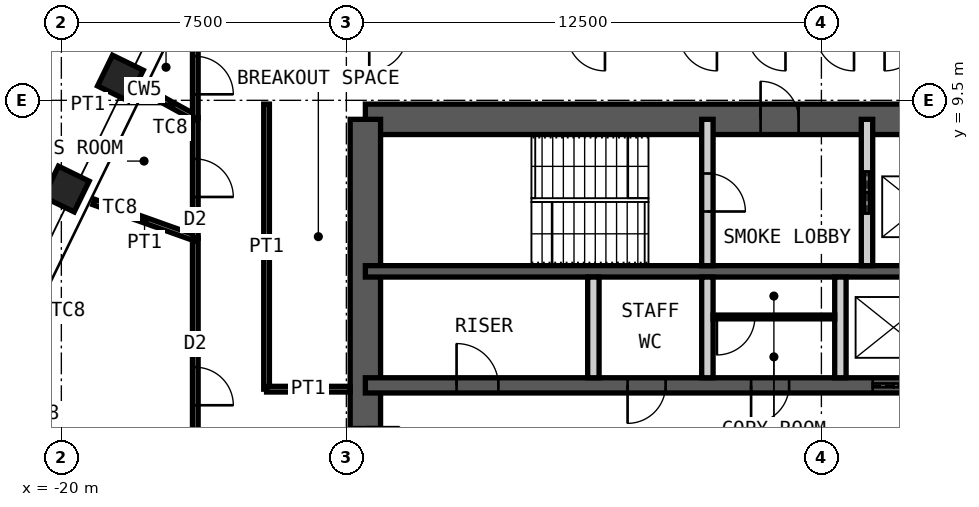
"""IFC4 building model, lengths in metres.
Left out: names, types, materials, properties, quantities, classifications, styles, units other than length and angle.
Written with IfcOpenShell. Run it as: python <this file> out.ifc"""

import sys

from ifc_helpers import new_model, si_unit, direction, frame, frame_2d, origin, origin_2d, place, context, subcontext, project, spatial, rectangle, hollow_rectangle, extrude, element, fill, save


model = new_model("IFC4")
c1 = context("Model", 3, precision=1e-05, world=origin(), true_north=direction((0.0, 1.0)))
c2 = subcontext(c1, "Body", "Model", "MODEL_VIEW")
j1 = project(units=[si_unit("LENGTHUNIT", "METRE"), si_unit("PLANEANGLEUNIT", "RADIAN")], contexts=[c1])
p1 = place(None, origin())
s1 = spatial("IfcSite", under=j1, at=p1, CompositionType="ELEMENT")
p2 = place(p1, origin())
s2 = spatial("IfcBuilding", under=s1, at=p2, CompositionType="ELEMENT")
p3 = place(p2, frame((0.0, 0.0, 312.4)))
s3 = spatial("IfcBuildingStorey", under=s2, at=p3, CompositionType="ELEMENT", Elevation=312.4)
for number, where, z_axis, x_axis in (
    (1, (-19.87, 7.166, 0.0), (0.0, 0.0, 1.0), (-0.438, -0.899, 0.0)),
    (2, (-18.446, 10.085, 0.0), (0.0, 0.0, 1.0), (-0.438, -0.899, 0.0)),
):
    element("IfcColumn", number, at=place(p3, frame(where, z_axis=z_axis, x_axis=x_axis)), inside=s3, PredefinedType="COLUMN", context=c2, shape_type="SweptSolid", body=[
        extrude(hollow_rectangle(XDim=0.9, YDim=0.9, WallThickness=0.05, at=origin_2d()), origin(), (0.0, 0.0, 1.0), 4.2),
    ])
p4 = place(p3, frame((-12.0, 9.0, 0.0), z_axis=(0.0, 0.0, 1.0), x_axis=(1.0, 0.0, 0.0)))
e3 = element("IfcWall", 3, at=p4, inside=s3, PredefinedType="SHEAR", context=c2, shape_type="SweptSolid", body=[
    extrude(rectangle(XDim=24.0, YDim=0.8, at=frame_2d((12.0, 0.0))), origin(), (0.0, 0.0, 1.0), 4.2),
])
p5 = place(p4, frame((10.4, 0.0, 0.0)))
e4 = element("IfcOpeningElement", 4, at=p5, cuts=e3, PredefinedType="OPENING", context=c2, shape_type="SweptSolid", body=[
    extrude(rectangle(XDim=1.0, YDim=2.1, at=frame_2d((0.5, 1.05))), frame((0.0, 0.41, 0.0), z_axis=(0.0, -1.0, 0.0), x_axis=(1.0, 0.0, 0.0)), (0.0, 0.0, 1.0), 0.82),
])
p6 = place(p4, frame((17.6, 0.0, 0.0)))
e5 = element("IfcOpeningElement", 5, at=p6, cuts=e3, PredefinedType="OPENING", context=c2, shape_type="SweptSolid", body=[
    extrude(rectangle(XDim=0.9, YDim=2.1, at=frame_2d((0.45, 1.05))), frame((0.0, 0.41, 0.0), z_axis=(0.0, -1.0, 0.0), x_axis=(1.0, 0.0, 0.0)), (0.0, 0.0, 1.0), 0.82),
])
p7 = place(p4, frame((21.9, 0.0, 0.0)))
e6 = element("IfcOpeningElement", 6, at=p7, cuts=e3, PredefinedType="OPENING", context=c2, shape_type="SweptSolid", body=[
    extrude(rectangle(XDim=0.9, YDim=2.1, at=frame_2d((0.45, 1.05))), frame((0.0, 0.41, 0.0), z_axis=(0.0, -1.0, 0.0), x_axis=(1.0, 0.0, 0.0)), (0.0, 0.0, 1.0), 0.82),
])
p8 = place(p3, frame((-12.0, -9.0, 0.0), z_axis=(0.0, 0.0, 1.0), x_axis=(0.0, 1.0, 0.0)))
e7 = element("IfcWall", 7, at=p8, inside=s3, PredefinedType="SHEAR", context=c2, shape_type="SweptSolid", body=[
    extrude(rectangle(XDim=18.0, YDim=0.8, at=frame_2d((9.0, 0.0))), origin(), (0.0, 0.0, 1.0), 4.2),
])
p9 = place(p8, frame((8.1, 0.0, 0.0)))
e8 = element("IfcOpeningElement", 8, at=p9, cuts=e7, PredefinedType="OPENING", context=c2, shape_type="SweptSolid", body=[
    extrude(rectangle(XDim=1.8, YDim=2.1, at=frame_2d((0.9, 1.05))), frame((0.0, 0.41, 0.0), z_axis=(0.0, -1.0, 0.0), x_axis=(1.0, 0.0, 0.0)), (0.0, 0.0, 1.0), 0.82),
])
p10 = place(p3, frame((-12.0, 5.0, 0.0), z_axis=(0.0, 0.0, 1.0), x_axis=(1.0, 0.0, 0.0)))
e9 = element("IfcWall", 9, at=p10, inside=s3, PredefinedType="SHEAR", context=c2, shape_type="SweptSolid", body=[
    extrude(rectangle(XDim=24.0, YDim=0.3, at=frame_2d((12.0, 0.0))), origin(), (0.0, 0.0, 1.0), 4.2),
])
p11 = place(p3, frame((-12.0, 2.0, 0.0), z_axis=(0.0, 0.0, 1.0), x_axis=(1.0, 0.0, 0.0)))
e10 = element("IfcWall", 10, at=p11, inside=s3, PredefinedType="SHEAR", context=c2, shape_type="SweptSolid", body=[
    extrude(rectangle(XDim=24.0, YDim=0.4, at=frame_2d((12.0, 0.0))), origin(), (0.0, 0.0, 1.0), 4.2),
])
p12 = place(p11, frame((2.4, 0.0, 0.0)))
e11 = element("IfcOpeningElement", 11, at=p12, cuts=e10, PredefinedType="OPENING", context=c2, shape_type="SweptSolid", body=[
    extrude(rectangle(XDim=1.1, YDim=2.1, at=frame_2d((0.55, 1.05))), frame((0.0, 0.21, 0.0), z_axis=(0.0, -1.0, 0.0), x_axis=(1.0, 0.0, 0.0)), (0.0, 0.0, 1.0), 0.42),
])
p13 = place(p11, frame((22.0, 0.0, 0.0)))
e12 = element("IfcOpeningElement", 12, at=p13, cuts=e10, PredefinedType="OPENING", context=c2, shape_type="SweptSolid", body=[
    extrude(rectangle(XDim=1.1, YDim=2.1, at=frame_2d((0.55, 1.05))), frame((0.0, 0.21, 0.0), z_axis=(0.0, -1.0, 0.0), x_axis=(1.0, 0.0, 0.0)), (0.0, 0.0, 1.0), 0.42),
])
p14 = place(p11, frame((10.15, 0.0, 0.0)))
e13 = element("IfcOpeningElement", 13, at=p14, cuts=e10, PredefinedType="OPENING", context=c2, shape_type="SweptSolid", body=[
    extrude(rectangle(XDim=1.0, YDim=2.1, at=frame_2d((0.5, 1.05))), frame((0.0, 0.21, 0.0), z_axis=(0.0, -1.0, 0.0), x_axis=(1.0, 0.0, 0.0)), (0.0, 0.0, 1.0), 0.42),
])
p15 = place(p11, frame((6.9, 0.0, 0.0)))
e14 = element("IfcOpeningElement", 14, at=p15, cuts=e10, PredefinedType="OPENING", context=c2, shape_type="SweptSolid", body=[
    extrude(rectangle(XDim=1.0, YDim=2.1, at=frame_2d((0.5, 1.05))), frame((0.0, 0.21, 0.0), z_axis=(0.0, -1.0, 0.0), x_axis=(1.0, 0.0, 0.0)), (0.0, 0.0, 1.0), 0.42),
])
p16 = place(p11, frame((13.35, 0.0, 0.0)))
e15 = element("IfcOpeningElement", 15, at=p16, cuts=e10, PredefinedType="OPENING", context=c2, shape_type="SweptSolid", body=[
    extrude(rectangle(XDim=1.1, YDim=2.4, at=frame_2d((0.55, 1.2))), frame((0.0, 0.21, 0.0), z_axis=(0.0, -1.0, 0.0), x_axis=(1.0, 0.0, 0.0)), (0.0, 0.0, 1.0), 0.42),
])
p17 = place(p11, frame((16.15, 0.0, 0.0)))
e16 = element("IfcOpeningElement", 16, at=p17, cuts=e10, PredefinedType="OPENING", context=c2, shape_type="SweptSolid", body=[
    extrude(rectangle(XDim=1.1, YDim=2.4, at=frame_2d((0.55, 1.2))), frame((0.0, 0.21, 0.0), z_axis=(0.0, -1.0, 0.0), x_axis=(1.0, 0.0, 0.0)), (0.0, 0.0, 1.0), 0.42),
])
p18 = place(p11, frame((19.0, 0.0, 0.0)))
e17 = element("IfcOpeningElement", 17, at=p18, cuts=e10, PredefinedType="OPENING", context=c2, shape_type="SweptSolid", body=[
    extrude(rectangle(XDim=1.0, YDim=2.1, at=frame_2d((0.5, 1.05))), frame((0.0, 0.21, 0.0), z_axis=(0.0, -1.0, 0.0), x_axis=(1.0, 0.0, 0.0)), (0.0, 0.0, 1.0), 0.42),
])
p19 = place(p3, frame((-3.0, 5.15, 0.0), z_axis=(0.0, 0.0, 1.0), x_axis=(0.0, 1.0, 0.0)))
e18 = element("IfcWall", 18, at=p19, inside=s3, PredefinedType="PARTITIONING", context=c2, shape_type="SweptSolid", body=[
    extrude(rectangle(XDim=3.85, YDim=0.3, at=frame_2d((1.925, 0.0))), origin(), (0.0, 0.0, 1.0), 3.98),
])
p20 = place(p19, frame((1.425, 0.0, 0.0)))
e19 = element("IfcOpeningElement", 19, at=p20, cuts=e18, PredefinedType="OPENING", context=c2, shape_type="SweptSolid", body=[
    extrude(rectangle(XDim=1.0, YDim=2.1, at=frame_2d((0.5, 1.05))), frame((0.0, 0.16, 0.0), z_axis=(0.0, -1.0, 0.0), x_axis=(1.0, 0.0, 0.0)), (0.0, 0.0, 1.0), 0.32),
])
p21 = place(p3, frame((1.2, 5.15, 0.0), z_axis=(0.0, 0.0, 1.0), x_axis=(0.0, 1.0, 0.0)))
e20 = element("IfcWall", 20, at=p21, inside=s3, PredefinedType="PARTITIONING", context=c2, shape_type="SweptSolid", body=[
    extrude(rectangle(XDim=3.85, YDim=0.3, at=frame_2d((1.925, 0.0))), origin(), (0.0, 0.0, 1.0), 3.98),
])
p22 = place(p21, frame((1.375, 0.0, 0.0)))
e21 = element("IfcOpeningElement", 21, at=p22, cuts=e20, PredefinedType="OPENING", context=c2, shape_type="SweptSolid", body=[
    extrude(rectangle(XDim=1.1, YDim=2.4, at=frame_2d((0.55, 1.2))), frame((0.0, 0.16, 0.0), z_axis=(0.0, -1.0, 0.0), x_axis=(1.0, 0.0, 0.0)), (0.0, 0.0, 1.0), 0.32),
])
for number, where, z_axis, x_axis in (
    (22, (-6.0, 2.2, 0.0), (0.0, 0.0, 1.0), (0.0, 1.0, 0.0)),
    (23, (-3.0, 2.2, 0.0), (0.0, 0.0, 1.0), (0.0, 1.0, 0.0)),
    (24, (0.5, 2.2, 0.0), (0.0, 0.0, 1.0), (0.0, 1.0, 0.0)),
):
    element("IfcWall", number, at=place(p3, frame(where, z_axis=z_axis, x_axis=x_axis)), inside=s3, PredefinedType="PARTITIONING", context=c2, shape_type="SweptSolid", body=[
        extrude(rectangle(XDim=2.65, YDim=0.3, at=frame_2d((1.325, 0.0))), origin(), (0.0, 0.0, 1.0), 3.98),
    ])
p23 = place(p3, frame((-2.85, 3.8, 0.0), z_axis=(0.0, 0.0, 1.0), x_axis=(1.0, 0.0, 0.0)))
e25 = element("IfcWall", 25, at=p23, inside=s3, PredefinedType="PARTITIONING", context=c2, shape_type="SweptSolid", body=[
    extrude(rectangle(XDim=3.2, YDim=0.1, at=frame_2d((1.6, 0.0))), origin(), (0.0, 0.0, 1.0), 3.98),
])
p24 = place(p23, frame((0.1, 0.0, 0.0)))
e26 = element("IfcOpeningElement", 26, at=p24, cuts=e25, PredefinedType="OPENING", context=c2, shape_type="SweptSolid", body=[
    extrude(rectangle(XDim=1.0, YDim=2.4, at=frame_2d((0.5, 1.2))), frame((0.0, 0.06, 0.0), z_axis=(0.0, -1.0, 0.0), x_axis=(1.0, 0.0, 0.0)), (0.0, 0.0, 1.0), 0.12),
])
p25 = place(p3, frame((-16.475, -1.919, 0.0), z_axis=(0.0, 0.0, 1.0), x_axis=(0.0, 1.0, 0.0)))
e27 = element("IfcWall", 27, at=p25, inside=s3, PredefinedType="PARTITIONING", context=c2, shape_type="SweptSolid", body=[
    extrude(rectangle(XDim=7.792, YDim=0.15, at=frame_2d((3.896, 0.0))), origin(), (0.0, 0.0, 1.0), 4.03),
])
p26 = place(p25, frame((3.396, 0.0, 0.0)))
e28 = element("IfcOpeningElement", 28, at=p26, cuts=e27, PredefinedType="OPENING", context=c2, shape_type="SweptSolid", body=[
    extrude(rectangle(XDim=1.0, YDim=2.4, at=frame_2d((0.5, 1.2))), frame((0.0, 0.085, 0.0), z_axis=(0.0, -1.0, 0.0), x_axis=(1.0, 0.0, 0.0)), (0.0, 0.0, 1.0), 0.17),
])
p27 = place(p3, frame((-19.146, 6.825, 0.0), z_axis=(0.0, 0.0, 1.0), x_axis=(0.94194625765, -0.335763678351, 0.0)))
e29 = element("IfcWall", 29, at=p27, inside=s3, PredefinedType="PARTITIONING", context=c2, shape_type="SweptSolid", body=[
    extrude(rectangle(XDim=2.836, YDim=0.15, at=frame_2d((1.418, 0.0))), origin(), (0.0, 0.0, 1.0), 3.33),
])
p28 = place(p3, frame((-16.475, 5.873, 0.0), z_axis=(0.0, 0.0, 1.0), x_axis=(0.0, 1.0, 0.0)))
e30 = element("IfcWall", 30, at=p28, inside=s3, PredefinedType="PARTITIONING", context=c2, shape_type="SweptSolid", body=[
    extrude(rectangle(XDim=3.169, YDim=0.15, at=frame_2d((1.584, 0.0))), origin(), (0.0, 0.0, 1.0), 4.03),
])
p29 = place(p28, frame((1.084, 0.0, 0.0)))
e31 = element("IfcOpeningElement", 31, at=p29, cuts=e30, PredefinedType="OPENING", context=c2, shape_type="SweptSolid", body=[
    extrude(rectangle(XDim=1.0, YDim=2.4, at=frame_2d((0.5, 1.2))), frame((0.0, 0.085, 0.0), z_axis=(0.0, -1.0, 0.0), x_axis=(1.0, 0.0, 0.0)), (0.0, 0.0, 1.0), 0.17),
])
p30 = place(p3, frame((-17.729, 9.73, 0.0), z_axis=(0.0, 0.0, 1.0), x_axis=(0.876633607687, -0.481158516369, 0.0)))
e32 = element("IfcWall", 32, at=p30, inside=s3, PredefinedType="PARTITIONING", context=c2, shape_type="SweptSolid", body=[
    extrude(rectangle(XDim=1.43, YDim=0.15, at=frame_2d((0.715, 0.0))), origin(), (0.0, 0.0, 1.0), 3.33),
])
p31 = place(p3, frame((-16.475, 9.042, 0.0), z_axis=(0.0, 0.0, 1.0), x_axis=(0.0, 1.0, 0.0)))
e33 = element("IfcWall", 33, at=p31, inside=s3, PredefinedType="PARTITIONING", context=c2, shape_type="SweptSolid", body=[
    extrude(rectangle(XDim=2.233, YDim=0.15, at=frame_2d((1.117, 0.0))), origin(), (0.0, 0.0, 1.0), 4.03),
])
p32 = place(p31, frame((0.617, 0.0, 0.0)))
e34 = element("IfcOpeningElement", 34, at=p32, cuts=e33, PredefinedType="OPENING", context=c2, shape_type="SweptSolid", body=[
    extrude(rectangle(XDim=1.0, YDim=2.4, at=frame_2d((0.5, 1.2))), frame((0.0, 0.085, 0.0), z_axis=(0.0, -1.0, 0.0), x_axis=(1.0, 0.0, 0.0)), (0.0, 0.0, 1.0), 0.17),
])
p33 = place(p3, frame((-14.6, 1.9, 0.0), z_axis=(0.0, 0.0, 1.0), x_axis=(0.0, 1.0, 0.0)))
e35 = element("IfcWall", 35, at=p33, inside=s3, PredefinedType="PARTITIONING", context=c2, shape_type="SweptSolid", body=[
    extrude(rectangle(XDim=7.5, YDim=0.15, at=frame_2d((3.75, 0.0))), origin(), (0.0, 0.0, 1.0), 4.03),
])
p34 = place(p3, frame((-12.4, 1.9, 0.0), z_axis=(0.0, 0.0, 1.0), x_axis=(-1.0, 0.0, 0.0)))
e36 = element("IfcWall", 36, at=p34, inside=s3, PredefinedType="PARTITIONING", context=c2, shape_type="SweptSolid", body=[
    extrude(rectangle(XDim=2.2, YDim=0.15, at=frame_2d((1.1, 0.0))), origin(), (0.0, 0.0, 1.0), 3.53),
])
p35 = place(p5, origin())
e37 = element("IfcDoor", 37, at=p35, inside=s3, OperationType="SINGLE_SWING_RIGHT", PredefinedType="DOOR", context=c2, shape_type="SweptSolid", body=[
    extrude(rectangle(XDim=1.0, YDim=2.1, at=frame_2d((0.5, 1.05))), frame((0.0, 0.025, 0.0), z_axis=(0.0, -1.0, 0.0), x_axis=(1.0, 0.0, 0.0)), (0.0, 0.0, 1.0), 0.05),
])
fill(e4, e37)
p36 = place(p20, origin())
e38 = element("IfcDoor", 38, at=p36, inside=s3, OperationType="SINGLE_SWING_LEFT", PredefinedType="DOOR", context=c2, shape_type="SweptSolid", body=[
    extrude(rectangle(XDim=1.0, YDim=2.1, at=frame_2d((0.5, 1.05))), frame((0.0, 0.025, 0.0), z_axis=(0.0, -1.0, 0.0), x_axis=(1.0, 0.0, 0.0)), (0.0, 0.0, 1.0), 0.05),
])
fill(e19, e38)
p37 = place(p12, origin())
e39 = element("IfcDoor", 39, at=p37, inside=s3, OperationType="SINGLE_SWING_RIGHT", PredefinedType="DOOR", context=c2, shape_type="SweptSolid", body=[
    extrude(rectangle(XDim=1.1, YDim=2.1, at=frame_2d((0.55, 1.05))), frame((0.0, 0.025, 0.0), z_axis=(0.0, -1.0, 0.0), x_axis=(1.0, 0.0, 0.0)), (0.0, 0.0, 1.0), 0.05),
])
fill(e11, e39)
p38 = place(p14, origin())
e40 = element("IfcDoor", 40, at=p38, inside=s3, OperationType="SINGLE_SWING_LEFT", PredefinedType="DOOR", context=c2, shape_type="SweptSolid", body=[
    extrude(rectangle(XDim=1.0, YDim=2.1, at=frame_2d((0.5, 1.05))), frame((0.0, 0.025, 0.0), z_axis=(0.0, -1.0, 0.0), x_axis=(1.0, 0.0, 0.0)), (0.0, 0.0, 1.0), 0.05),
])
fill(e13, e40)
p39 = place(p9, origin())
e41 = element("IfcDoor", 41, at=p39, inside=s3, OperationType="DOUBLE_DOOR_DOUBLE_SWING", PredefinedType="DOOR", context=c2, shape_type="SweptSolid", body=[
    extrude(rectangle(XDim=1.8, YDim=2.1, at=frame_2d((0.9, 1.05))), frame((0.0, 0.025, 0.0), z_axis=(0.0, -1.0, 0.0), x_axis=(1.0, 0.0, 0.0)), (0.0, 0.0, 1.0), 0.05),
])
fill(e8, e41)
p40 = place(p22, origin())
e42 = element("IfcDoor", 42, at=p40, inside=s3, OperationType="DOUBLE_DOOR_SLIDING", PredefinedType="DOOR", context=c2, shape_type="SweptSolid", body=[
    extrude(rectangle(XDim=1.1, YDim=2.4, at=frame_2d((0.55, 1.2))), frame((0.0, 0.025, 0.0), z_axis=(0.0, -1.0, 0.0), x_axis=(1.0, 0.0, 0.0)), (0.0, 0.0, 1.0), 0.05),
])
fill(e21, e42)
p41 = place(p15, origin())
e43 = element("IfcDoor", 43, at=p41, inside=s3, OperationType="SINGLE_SWING_LEFT", PredefinedType="DOOR", context=c2, shape_type="SweptSolid", body=[
    extrude(rectangle(XDim=1.0, YDim=2.1, at=frame_2d((0.5, 1.05))), frame((0.0, 0.025, 0.0), z_axis=(0.0, -1.0, 0.0), x_axis=(1.0, 0.0, 0.0)), (0.0, 0.0, 1.0), 0.05),
])
fill(e14, e43)
p42 = place(p16, origin())
e44 = element("IfcDoor", 44, at=p42, inside=s3, OperationType="DOUBLE_DOOR_SLIDING", PredefinedType="DOOR", context=c2, shape_type="SweptSolid", body=[
    extrude(rectangle(XDim=1.1, YDim=2.4, at=frame_2d((0.55, 1.2))), frame((0.0, 0.025, 0.0), z_axis=(0.0, -1.0, 0.0), x_axis=(1.0, 0.0, 0.0)), (0.0, 0.0, 1.0), 0.05),
])
fill(e15, e44)
p43 = place(p24, origin())
e45 = element("IfcDoor", 45, at=p43, inside=s3, OperationType="SINGLE_SWING_LEFT", PredefinedType="DOOR", context=c2, shape_type="SweptSolid", body=[
    extrude(rectangle(XDim=1.0, YDim=2.4, at=frame_2d((0.5, 1.2))), frame((0.0, 0.025, 0.0), z_axis=(0.0, -1.0, 0.0), x_axis=(1.0, 0.0, 0.0)), (0.0, 0.0, 1.0), 0.05),
])
fill(e26, e45)
p44 = place(p26, origin())
e46 = element("IfcDoor", 46, at=p44, inside=s3, OperationType="SINGLE_SWING_LEFT", PredefinedType="DOOR", context=c2, shape_type="SweptSolid", body=[
    extrude(rectangle(XDim=1.0, YDim=2.4, at=frame_2d((0.5, 1.2))), frame((0.0, 0.025, 0.0), z_axis=(0.0, -1.0, 0.0), x_axis=(1.0, 0.0, 0.0)), (0.0, 0.0, 1.0), 0.05),
])
fill(e28, e46)
p45 = place(p29, origin())
e47 = element("IfcDoor", 47, at=p45, inside=s3, OperationType="SINGLE_SWING_LEFT", PredefinedType="DOOR", context=c2, shape_type="SweptSolid", body=[
    extrude(rectangle(XDim=1.0, YDim=2.4, at=frame_2d((0.5, 1.2))), frame((0.0, 0.025, 0.0), z_axis=(0.0, -1.0, 0.0), x_axis=(1.0, 0.0, 0.0)), (0.0, 0.0, 1.0), 0.05),
])
fill(e31, e47)
p46 = place(p32, origin())
e48 = element("IfcDoor", 48, at=p46, inside=s3, OperationType="SINGLE_SWING_LEFT", PredefinedType="DOOR", context=c2, shape_type="SweptSolid", body=[
    extrude(rectangle(XDim=1.0, YDim=2.4, at=frame_2d((0.5, 1.2))), frame((0.0, 0.025, 0.0), z_axis=(0.0, -1.0, 0.0), x_axis=(1.0, 0.0, 0.0)), (0.0, 0.0, 1.0), 0.05),
])
fill(e34, e48)
save(model, sys.argv[1])
